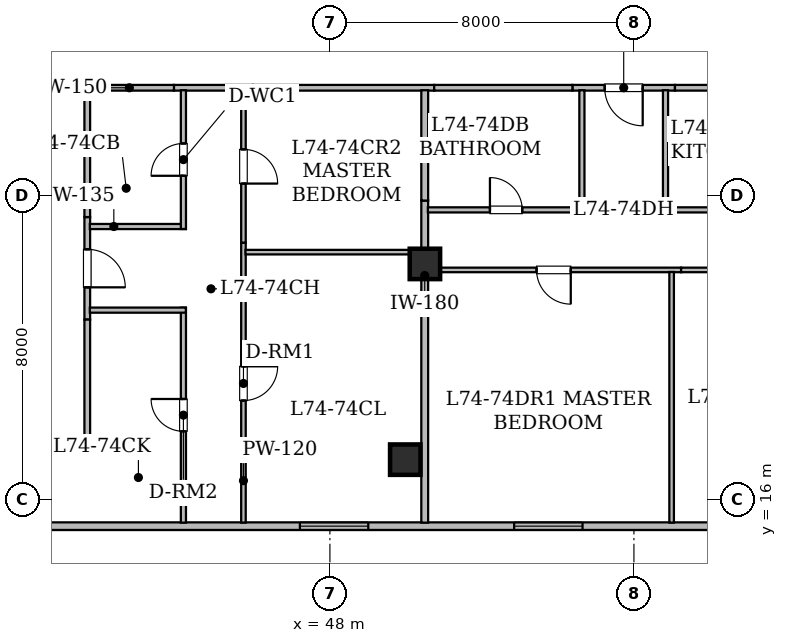
"""IFC4 building model, lengths in metres.
Left out: names, types, materials, properties, quantities, classifications, styles, units other than length and angle.
Written with IfcOpenShell. Run it as: python <this file> out.ifc"""

import sys

from ifc_helpers import new_model, si_unit, direction, frame, frame_2d, origin, origin_2d, place, context, subcontext, project, spatial, rectangle, hollow_rectangle, extrude, element, fill, save


model = new_model("IFC4")
c1 = context("Model", 3, precision=1e-05, world=origin(), true_north=direction((0.0, 1.0)))
c2 = subcontext(c1, "Body", "Model", "MODEL_VIEW")
j1 = project(units=[si_unit("LENGTHUNIT", "METRE"), si_unit("PLANEANGLEUNIT", "RADIAN")], contexts=[c1])
p1 = place(None, origin())
s1 = spatial("IfcSite", under=j1, at=p1, CompositionType="ELEMENT")
p2 = place(p1, origin())
s2 = spatial("IfcBuilding", under=s1, at=p2, CompositionType="ELEMENT")
p3 = place(p2, frame((0.0, 0.0, 290.45)))
s3 = spatial("IfcBuildingStorey", under=s2, at=p3, CompositionType="ELEMENT", Elevation=290.45)
p4 = place(p3, frame((49.983, 17.05, 0.0), z_axis=(0.0, 0.0, 1.0), x_axis=(1.0, 0.0, 0.0)))
e1 = element("IfcColumn", 1, at=p4, inside=s3, PredefinedType="COLUMN", context=c2, shape_type="SweptSolid", body=[
    extrude(hollow_rectangle(XDim=0.8, YDim=0.8, WallThickness=0.04, at=origin_2d()), origin(), (0.0, 0.0, 1.0), 4.175),
])
p5 = place(p3, frame((50.5, 22.2, 0.0), z_axis=(0.0, 0.0, 1.0), x_axis=(1.0, 0.0, 0.0)))
e2 = element("IfcColumn", 2, at=p5, inside=s3, PredefinedType="COLUMN", context=c2, shape_type="SweptSolid", body=[
    extrude(hollow_rectangle(XDim=0.8, YDim=0.8, WallThickness=0.04, at=origin_2d()), origin(), (0.0, 0.0, 1.0), 4.2),
])
p6 = place(p3, frame((61.696, 15.3, 0.0), z_axis=(0.0, 0.0, 1.0), x_axis=(-1.0, 0.0, 0.0)))
e3 = element("IfcWall", 3, at=p6, inside=s3, PredefinedType="STANDARD", context=c2, shape_type="SweptSolid", body=[
    extrude(rectangle(XDim=33.393, YDim=0.2, at=frame_2d((16.697, 0.0))), origin(), (0.0, 0.0, 1.0), 3.78),
])
p7 = place(p6, frame((26.486, 0.0, 0.85)))
e4 = element("IfcOpeningElement", 4, at=p7, cuts=e3, PredefinedType="OPENING", context=c2, shape_type="SweptSolid", body=[
    extrude(rectangle(XDim=1.8, YDim=0.92, at=frame_2d((0.9, 0.46))), frame((0.0, 0.11, 0.0), z_axis=(0.0, -1.0, 0.0), x_axis=(1.0, 0.0, 0.0)), (0.0, 0.0, 1.0), 0.22),
])
p8 = place(p6, frame((12.686, 0.0, 0.85)))
e5 = element("IfcOpeningElement", 5, at=p8, cuts=e3, PredefinedType="OPENING", context=c2, shape_type="SweptSolid", body=[
    extrude(rectangle(XDim=1.8, YDim=0.92, at=frame_2d((0.9, 0.46))), frame((0.0, 0.11, 0.0), z_axis=(0.0, -1.0, 0.0), x_axis=(1.0, 0.0, 0.0)), (0.0, 0.0, 1.0), 0.22),
])
p9 = place(p6, frame((7.048, 0.0, 0.85)))
e6 = element("IfcOpeningElement", 6, at=p9, cuts=e3, PredefinedType="OPENING", context=c2, shape_type="SweptSolid", body=[
    extrude(rectangle(XDim=1.8, YDim=0.92, at=frame_2d((0.9, 0.46))), frame((0.0, 0.11, 0.0), z_axis=(0.0, -1.0, 0.0), x_axis=(1.0, 0.0, 0.0)), (0.0, 0.0, 1.0), 0.22),
])
p10 = place(p6, frame((1.844, 0.0, 0.85)))
e7 = element("IfcOpeningElement", 7, at=p10, cuts=e3, PredefinedType="OPENING", context=c2, shape_type="SweptSolid", body=[
    extrude(rectangle(XDim=1.8, YDim=0.92, at=frame_2d((0.9, 0.46))), frame((0.0, 0.11, 0.0), z_axis=(0.0, -1.0, 0.0), x_axis=(1.0, 0.0, 0.0)), (0.0, 0.0, 1.0), 0.22),
])
p11 = place(p3, frame((45.974, 26.835, 0.0), z_axis=(0.0, 0.0, 1.0), x_axis=(-1.0, 0.0, 0.0)))
e8 = element("IfcWall", 8, at=p11, inside=s3, PredefinedType="STANDARD", context=c2, shape_type="SweptSolid", body=[
    extrude(rectangle(XDim=2.078, YDim=0.15, at=frame_2d((1.039, 0.0))), origin(), (0.0, 0.0, 1.0), 3.78),
])
p12 = place(p3, frame((41.615, 23.433, 0.0), z_axis=(0.0, 0.0, 1.0), x_axis=(0.0, -1.0, 0.0)))
e9 = element("IfcWall", 9, at=p12, inside=s3, PredefinedType="STANDARD", context=c2, shape_type="SweptSolid", body=[
    extrude(rectangle(XDim=2.698, YDim=0.15, at=frame_2d((1.349, 0.0))), origin(), (0.0, 0.0, 1.0), 2.22),
])
p13 = place(p12, frame((0.849, 0.0, 0.0)))
e10 = element("IfcOpeningElement", 10, at=p13, cuts=e9, PredefinedType="OPENING", context=c2, shape_type="SweptSolid", body=[
    extrude(rectangle(XDim=1.0, YDim=2.15, at=frame_2d((0.5, 1.075))), frame((0.0, 0.085, 0.0), z_axis=(0.0, -1.0, 0.0), x_axis=(1.0, 0.0, 0.0)), (0.0, 0.0, 1.0), 0.17),
])
p14 = place(p3, frame((43.896, 26.835, 0.0), z_axis=(0.0, 0.0, 1.0), x_axis=(-1.0, 0.0, 0.0)))
e11 = element("IfcWall", 11, at=p14, inside=s3, PredefinedType="STANDARD", context=c2, shape_type="SweptSolid", body=[
    extrude(rectangle(XDim=2.346, YDim=0.15, at=frame_2d((1.173, 0.0))), origin(), (0.0, 0.0, 1.0), 3.78),
])
p15 = place(p3, frame((41.615, 26.898, 0.0), z_axis=(0.0, 0.0, 1.0), x_axis=(0.0, -1.0, 0.0)))
e12 = element("IfcWall", 12, at=p15, inside=s3, PredefinedType="STANDARD", context=c2, shape_type="SweptSolid", body=[
    extrude(rectangle(XDim=3.465, YDim=0.15, at=frame_2d((1.732, 0.0))), origin(), (0.0, 0.0, 1.0), 2.22),
])
p16 = place(p3, frame((41.615, 20.735, 0.0), z_axis=(0.0, 0.0, 1.0), x_axis=(0.0, -1.0, 0.0)))
e13 = element("IfcWall", 13, at=p16, inside=s3, PredefinedType="STANDARD", context=c2, shape_type="SweptSolid", body=[
    extrude(rectangle(XDim=3.135, YDim=0.15, at=frame_2d((1.567, 0.0))), origin(), (0.0, 0.0, 1.0), 2.22),
])
p17 = place(p3, frame((50.744, 26.835, 0.0), z_axis=(0.0, 0.0, 1.0), x_axis=(-1.0, 0.0, 0.0)))
e14 = element("IfcWall", 14, at=p17, inside=s3, PredefinedType="STANDARD", context=c2, shape_type="SweptSolid", body=[
    extrude(rectangle(XDim=4.77, YDim=0.15, at=frame_2d((2.385, 0.0))), origin(), (0.0, 0.0, 1.0), 2.22),
])
p18 = place(p3, frame((57.08, 26.835, 0.0), z_axis=(0.0, 0.0, 1.0), x_axis=(-1.0, 0.0, 0.0)))
e15 = element("IfcWall", 15, at=p18, inside=s3, PredefinedType="STANDARD", context=c2, shape_type="SweptSolid", body=[
    extrude(rectangle(XDim=2.698, YDim=0.15, at=frame_2d((1.349, 0.0))), origin(), (0.0, 0.0, 1.0), 3.78),
])
p19 = place(p18, frame((0.849, 0.0, 0.0)))
e16 = element("IfcOpeningElement", 16, at=p19, cuts=e15, PredefinedType="OPENING", context=c2, shape_type="SweptSolid", body=[
    extrude(rectangle(XDim=1.0, YDim=2.15, at=frame_2d((0.5, 1.075))), frame((0.0, 0.085, 0.0), z_axis=(0.0, -1.0, 0.0), x_axis=(1.0, 0.0, 0.0)), (0.0, 0.0, 1.0), 0.17),
])
p20 = place(p3, frame((54.382, 26.835, 0.0), z_axis=(0.0, 0.0, 1.0), x_axis=(-1.0, 0.0, 0.0)))
e17 = element("IfcWall", 17, at=p20, inside=s3, PredefinedType="STANDARD", context=c2, shape_type="SweptSolid", body=[
    extrude(rectangle(XDim=3.638, YDim=0.15, at=frame_2d((1.819, 0.0))), origin(), (0.0, 0.0, 1.0), 2.22),
])
p21 = place(p3, frame((60.69, 26.835, 0.0), z_axis=(0.0, 0.0, 1.0), x_axis=(-1.0, 0.0, 0.0)))
e18 = element("IfcWall", 18, at=p21, inside=s3, PredefinedType="STANDARD", context=c2, shape_type="SweptSolid", body=[
    extrude(rectangle(XDim=3.61, YDim=0.15, at=frame_2d((1.805, 0.0))), origin(), (0.0, 0.0, 1.0), 3.78),
])
p22 = place(p3, frame((41.682, 23.184, 0.0), z_axis=(0.0, 0.0, 1.0), x_axis=(1.0, 0.0, 0.0)))
e19 = element("IfcWall", 19, at=p22, inside=s3, PredefinedType="PARTITIONING", context=c2, shape_type="SweptSolid", body=[
    extrude(rectangle(XDim=2.528, YDim=0.135, at=frame_2d((1.264, 0.0))), origin(), (0.0, 0.0, 1.0), 2.22),
])
p23 = place(p3, frame((44.145, 23.119, 0.0), z_axis=(0.0, 0.0, 1.0), x_axis=(0.0, 1.0, 0.0)))
e20 = element("IfcWall", 20, at=p23, inside=s3, PredefinedType="PARTITIONING", context=c2, shape_type="SweptSolid", body=[
    extrude(rectangle(XDim=3.651, YDim=0.135, at=frame_2d((1.826, 0.0))), origin(), (0.0, 0.0, 1.0), 2.22),
])
p24 = place(p23, frame((1.4, 0.0, 0.0)))
e21 = element("IfcOpeningElement", 21, at=p24, cuts=e20, PredefinedType="OPENING", context=c2, shape_type="SweptSolid", body=[
    extrude(rectangle(XDim=0.85, YDim=2.1, at=frame_2d((0.425, 1.05))), frame((0.0, 0.077, 0.0), z_axis=(0.0, -1.0, 0.0), x_axis=(1.0, 0.0, 0.0)), (0.0, 0.0, 1.0), 0.155),
])
p25 = place(p3, frame((44.145, 15.392, 0.0), z_axis=(0.0, 0.0, 1.0), x_axis=(0.0, 1.0, 0.0)))
e22 = element("IfcWall", 22, at=p25, inside=s3, PredefinedType="PARTITIONING", context=c2, shape_type="SweptSolid", body=[
    extrude(rectangle(XDim=5.657, YDim=0.135, at=frame_2d((2.829, 0.0))), origin(), (0.0, 0.0, 1.0), 2.22),
])
p26 = place(p25, frame((2.404, 0.0, 0.0)))
e23 = element("IfcOpeningElement", 23, at=p26, cuts=e22, PredefinedType="OPENING", context=c2, shape_type="SweptSolid", body=[
    extrude(rectangle(XDim=0.85, YDim=2.1, at=frame_2d((0.425, 1.05))), frame((0.0, 0.077, 0.0), z_axis=(0.0, -1.0, 0.0), x_axis=(1.0, 0.0, 0.0)), (0.0, 0.0, 1.0), 0.155),
])
p27 = place(p3, frame((44.21, 20.984, 0.0), z_axis=(0.0, 0.0, 1.0), x_axis=(-1.0, 0.0, 0.0)))
e24 = element("IfcWall", 24, at=p27, inside=s3, PredefinedType="PARTITIONING", context=c2, shape_type="SweptSolid", body=[
    extrude(rectangle(XDim=2.528, YDim=0.135, at=frame_2d((1.264, 0.0))), origin(), (0.0, 0.0, 1.0), 2.22),
])
p28 = place(p3, frame((45.725, 22.759, 0.0), z_axis=(0.0, 0.0, 1.0), x_axis=(0.0, -1.0, 0.0)))
e25 = element("IfcWall", 25, at=p28, inside=s3, PredefinedType="PARTITIONING", context=c2, shape_type="SweptSolid", body=[
    extrude(rectangle(XDim=7.367, YDim=0.12, at=frame_2d((3.684, 0.0))), origin(), (0.0, 0.0, 1.0), 2.22),
])
p29 = place(p28, frame((3.254, 0.0, 0.0)))
e26 = element("IfcOpeningElement", 26, at=p29, cuts=e25, PredefinedType="OPENING", context=c2, shape_type="SweptSolid", body=[
    extrude(rectangle(XDim=0.9, YDim=2.1, at=frame_2d((0.45, 1.05))), frame((0.0, 0.07, 0.0), z_axis=(0.0, -1.0, 0.0), x_axis=(1.0, 0.0, 0.0)), (0.0, 0.0, 1.0), 0.14),
])
p30 = place(p3, frame((45.725, 26.77, 0.0), z_axis=(0.0, 0.0, 1.0), x_axis=(0.0, -1.0, 0.0)))
e27 = element("IfcWall", 27, at=p30, inside=s3, PredefinedType="PARTITIONING", context=c2, shape_type="SweptSolid", body=[
    extrude(rectangle(XDim=4.011, YDim=0.12, at=frame_2d((2.005, 0.0))), origin(), (0.0, 0.0, 1.0), 2.22),
])
p31 = place(p30, frame((1.556, 0.0, 0.0)))
e28 = element("IfcOpeningElement", 28, at=p31, cuts=e27, PredefinedType="OPENING", context=c2, shape_type="SweptSolid", body=[
    extrude(rectangle(XDim=0.9, YDim=2.1, at=frame_2d((0.45, 1.05))), frame((0.0, 0.07, 0.0), z_axis=(0.0, -1.0, 0.0), x_axis=(1.0, 0.0, 0.0)), (0.0, 0.0, 1.0), 0.14),
])
p32 = place(p3, frame((45.779, 22.51, 0.0), z_axis=(0.0, 0.0, 1.0), x_axis=(1.0, 0.0, 0.0)))
e29 = element("IfcWall", 29, at=p32, inside=s3, PredefinedType="PARTITIONING", context=c2, shape_type="SweptSolid", body=[
    extrude(rectangle(XDim=4.651, YDim=0.12, at=frame_2d((2.325, 0.0))), origin(), (0.0, 0.0, 1.0), 2.22),
])
p33 = place(p3, frame((50.495, 22.445, 0.0), z_axis=(0.0, 0.0, 1.0), x_axis=(0.0, -1.0, 0.0)))
e30 = element("IfcWall", 30, at=p33, inside=s3, PredefinedType="STANDARD", context=c2, shape_type="SweptSolid", body=[
    extrude(rectangle(XDim=0.647, YDim=0.18, at=frame_2d((0.323, 0.0))), origin(), (0.0, 0.0, 1.0), 2.22),
])
p34 = place(p3, frame((50.495, 21.798, 0.0), z_axis=(0.0, 0.0, 1.0), x_axis=(0.0, -1.0, 0.0)))
e31 = element("IfcWall", 31, at=p34, inside=s3, PredefinedType="STANDARD", context=c2, shape_type="SweptSolid", body=[
    extrude(rectangle(XDim=6.406, YDim=0.18, at=frame_2d((3.203, 0.0))), origin(), (0.0, 0.0, 1.0), 2.22),
])
p35 = place(p3, frame((50.495, 23.867, 0.0), z_axis=(0.0, 0.0, 1.0), x_axis=(0.0, -1.0, 0.0)))
e32 = element("IfcWall", 32, at=p35, inside=s3, PredefinedType="STANDARD", context=c2, shape_type="SweptSolid", body=[
    extrude(rectangle(XDim=1.292, YDim=0.18, at=frame_2d((0.646, 0.0))), origin(), (0.0, 0.0, 1.0), 2.22),
])
p36 = place(p3, frame((50.495, 26.77, 0.0), z_axis=(0.0, 0.0, 1.0), x_axis=(0.0, -1.0, 0.0)))
e33 = element("IfcWall", 33, at=p36, inside=s3, PredefinedType="STANDARD", context=c2, shape_type="SweptSolid", body=[
    extrude(rectangle(XDim=2.903, YDim=0.18, at=frame_2d((1.452, 0.0))), origin(), (0.0, 0.0, 1.0), 2.22),
])
p37 = place(p3, frame((50.577, 23.622, 0.0), z_axis=(0.0, 0.0, 1.0), x_axis=(1.0, 0.0, 0.0)))
e34 = element("IfcWall", 34, at=p37, inside=s3, PredefinedType="PARTITIONING", context=c2, shape_type="SweptSolid", body=[
    extrude(rectangle(XDim=4.119, YDim=0.135, at=frame_2d((2.06, 0.0))), origin(), (0.0, 0.0, 1.0), 2.22),
])
p38 = place(p37, frame((1.634, 0.0, 0.0)))
e35 = element("IfcOpeningElement", 35, at=p38, cuts=e34, PredefinedType="OPENING", context=c2, shape_type="SweptSolid", body=[
    extrude(rectangle(XDim=0.85, YDim=2.1, at=frame_2d((0.425, 1.05))), frame((0.0, 0.077, 0.0), z_axis=(0.0, -1.0, 0.0), x_axis=(1.0, 0.0, 0.0)), (0.0, 0.0, 1.0), 0.155),
])
for number, where, z_axis, x_axis in (
    (36, (54.631, 23.557, 0.0), (0.0, 0.0, 1.0), (0.0, 1.0, 0.0)),
    (37, (56.831, 26.77, 0.0), (0.0, 0.0, 1.0), (0.0, -1.0, 0.0)),
):
    element("IfcWall", number, at=place(p3, frame(where, z_axis=z_axis, x_axis=x_axis)), inside=s3, PredefinedType="PARTITIONING", context=c2, shape_type="SweptSolid", body=[
        extrude(rectangle(XDim=3.213, YDim=0.135, at=frame_2d((1.606, 0.0))), origin(), (0.0, 0.0, 1.0), 3.78),
    ])
p39 = place(p3, frame((56.766, 23.622, 0.0), z_axis=(0.0, 0.0, 1.0), x_axis=(1.0, 0.0, 0.0)))
e38 = element("IfcWall", 38, at=p39, inside=s3, PredefinedType="PARTITIONING", context=c2, shape_type="SweptSolid", body=[
    extrude(rectangle(XDim=4.995, YDim=0.135, at=frame_2d((2.498, 0.0))), origin(), (0.0, 0.0, 1.0), 2.22),
])
p40 = place(p39, frame((2.073, 0.0, 0.0)))
e39 = element("IfcOpeningElement", 39, at=p40, cuts=e38, PredefinedType="OPENING", context=c2, shape_type="SweptSolid", body=[
    extrude(rectangle(XDim=0.85, YDim=2.1, at=frame_2d((0.425, 1.05))), frame((0.0, 0.077, 0.0), z_axis=(0.0, -1.0, 0.0), x_axis=(1.0, 0.0, 0.0)), (0.0, 0.0, 1.0), 0.155),
])
p41 = place(p3, frame((57.241, 22.042, 0.0), z_axis=(0.0, 0.0, 1.0), x_axis=(-1.0, 0.0, 0.0)))
e40 = element("IfcWall", 40, at=p41, inside=s3, PredefinedType="PARTITIONING", context=c2, shape_type="SweptSolid", body=[
    extrude(rectangle(XDim=6.664, YDim=0.12, at=frame_2d((3.332, 0.0))), origin(), (0.0, 0.0, 1.0), 2.22),
])
p42 = place(p41, frame((2.903, 0.0, 0.0)))
e41 = element("IfcOpeningElement", 41, at=p42, cuts=e40, PredefinedType="OPENING", context=c2, shape_type="SweptSolid", body=[
    extrude(rectangle(XDim=0.9, YDim=2.1, at=frame_2d((0.45, 1.05))), frame((0.0, 0.07, 0.0), z_axis=(0.0, -1.0, 0.0), x_axis=(1.0, 0.0, 0.0)), (0.0, 0.0, 1.0), 0.14),
])
p43 = place(p3, frame((64.808, 22.042, 0.0), z_axis=(0.0, 0.0, 1.0), x_axis=(-1.0, 0.0, 0.0)))
e42 = element("IfcWall", 42, at=p43, inside=s3, PredefinedType="PARTITIONING", context=c2, shape_type="SweptSolid", body=[
    extrude(rectangle(XDim=7.567, YDim=0.12, at=frame_2d((3.784, 0.0))), origin(), (0.0, 0.0, 1.0), 2.22),
])
p44 = place(p43, frame((3.333, 0.0, 0.0)))
e43 = element("IfcOpeningElement", 43, at=p44, cuts=e42, PredefinedType="OPENING", context=c2, shape_type="SweptSolid", body=[
    extrude(rectangle(XDim=0.9, YDim=2.1, at=frame_2d((0.45, 1.05))), frame((0.0, 0.07, 0.0), z_axis=(0.0, -1.0, 0.0), x_axis=(1.0, 0.0, 0.0)), (0.0, 0.0, 1.0), 0.14),
])
p45 = place(p3, frame((56.992, 21.988, 0.0), z_axis=(0.0, 0.0, 1.0), x_axis=(0.0, -1.0, 0.0)))
e44 = element("IfcWall", 44, at=p45, inside=s3, PredefinedType="PARTITIONING", context=c2, shape_type="SweptSolid", body=[
    extrude(rectangle(XDim=6.596, YDim=0.12, at=frame_2d((3.298, 0.0))), origin(), (0.0, 0.0, 1.0), 2.22),
])
p46 = place(p8, origin())
e45 = element("IfcWindow", 45, at=p46, inside=s3, PartitioningType="SINGLE_PANEL", PredefinedType="WINDOW", context=c2, shape_type="SweptSolid", body=[
    extrude(rectangle(XDim=1.8, YDim=0.92, at=frame_2d((0.9, 0.46))), frame((0.0, 0.03, 0.0), z_axis=(0.0, -1.0, 0.0), x_axis=(1.0, 0.0, 0.0)), (0.0, 0.0, 1.0), 0.06),
])
fill(e5, e45)
p47 = place(p9, origin())
e46 = element("IfcWindow", 46, at=p47, inside=s3, PartitioningType="SINGLE_PANEL", PredefinedType="WINDOW", context=c2, shape_type="SweptSolid", body=[
    extrude(rectangle(XDim=1.8, YDim=0.92, at=frame_2d((0.9, 0.46))), frame((0.0, 0.03, 0.0), z_axis=(0.0, -1.0, 0.0), x_axis=(1.0, 0.0, 0.0)), (0.0, 0.0, 1.0), 0.06),
])
fill(e6, e46)
p48 = place(p13, origin())
e47 = element("IfcDoor", 47, at=p48, inside=s3, OperationType="SINGLE_SWING_RIGHT", PredefinedType="DOOR", context=c2, shape_type="SweptSolid", body=[
    extrude(rectangle(XDim=1.0, YDim=2.15, at=frame_2d((0.5, 1.075))), frame((0.0, 0.025, 0.0), z_axis=(0.0, -1.0, 0.0), x_axis=(1.0, 0.0, 0.0)), (0.0, 0.0, 1.0), 0.05),
])
fill(e10, e47)
p49 = place(p19, origin())
e48 = element("IfcDoor", 48, at=p49, inside=s3, OperationType="SINGLE_SWING_LEFT", PredefinedType="DOOR", context=c2, shape_type="SweptSolid", body=[
    extrude(rectangle(XDim=1.0, YDim=2.15, at=frame_2d((0.5, 1.075))), frame((0.0, 0.025, 0.0), z_axis=(0.0, -1.0, 0.0), x_axis=(1.0, 0.0, 0.0)), (0.0, 0.0, 1.0), 0.05),
])
fill(e16, e48)
p50 = place(p24, origin())
e49 = element("IfcDoor", 49, at=p50, inside=s3, OperationType="SINGLE_SWING_LEFT", PredefinedType="DOOR", context=c2, shape_type="SweptSolid", body=[
    extrude(rectangle(XDim=0.85, YDim=2.1, at=frame_2d((0.425, 1.05))), frame((0.0, 0.025, 0.0), z_axis=(0.0, -1.0, 0.0), x_axis=(1.0, 0.0, 0.0)), (0.0, 0.0, 1.0), 0.05),
])
fill(e21, e49)
p51 = place(p26, origin())
e50 = element("IfcDoor", 50, at=p51, inside=s3, OperationType="SINGLE_SWING_RIGHT", PredefinedType="DOOR", context=c2, shape_type="SweptSolid", body=[
    extrude(rectangle(XDim=0.85, YDim=2.1, at=frame_2d((0.425, 1.05))), frame((0.0, 0.025, 0.0), z_axis=(0.0, -1.0, 0.0), x_axis=(1.0, 0.0, 0.0)), (0.0, 0.0, 1.0), 0.05),
])
fill(e23, e50)
p52 = place(p29, origin())
e51 = element("IfcDoor", 51, at=p52, inside=s3, OperationType="SINGLE_SWING_LEFT", PredefinedType="DOOR", context=c2, shape_type="SweptSolid", body=[
    extrude(rectangle(XDim=0.9, YDim=2.1, at=frame_2d((0.45, 1.05))), frame((0.0, 0.025, 0.0), z_axis=(0.0, -1.0, 0.0), x_axis=(1.0, 0.0, 0.0)), (0.0, 0.0, 1.0), 0.05),
])
fill(e26, e51)
p53 = place(p31, origin())
e52 = element("IfcDoor", 52, at=p53, inside=s3, OperationType="SINGLE_SWING_RIGHT", PredefinedType="DOOR", context=c2, shape_type="SweptSolid", body=[
    extrude(rectangle(XDim=0.9, YDim=2.1, at=frame_2d((0.45, 1.05))), frame((0.0, 0.025, 0.0), z_axis=(0.0, -1.0, 0.0), x_axis=(1.0, 0.0, 0.0)), (0.0, 0.0, 1.0), 0.05),
])
fill(e28, e52)
p54 = place(p38, origin())
e53 = element("IfcDoor", 53, at=p54, inside=s3, OperationType="SINGLE_SWING_LEFT", PredefinedType="DOOR", context=c2, shape_type="SweptSolid", body=[
    extrude(rectangle(XDim=0.85, YDim=2.1, at=frame_2d((0.425, 1.05))), frame((0.0, 0.025, 0.0), z_axis=(0.0, -1.0, 0.0), x_axis=(1.0, 0.0, 0.0)), (0.0, 0.0, 1.0), 0.05),
])
fill(e35, e53)
p55 = place(p42, origin())
e54 = element("IfcDoor", 54, at=p55, inside=s3, OperationType="SINGLE_SWING_LEFT", PredefinedType="DOOR", context=c2, shape_type="SweptSolid", body=[
    extrude(rectangle(XDim=0.9, YDim=2.1, at=frame_2d((0.45, 1.05))), frame((0.0, 0.025, 0.0), z_axis=(0.0, -1.0, 0.0), x_axis=(1.0, 0.0, 0.0)), (0.0, 0.0, 1.0), 0.05),
])
fill(e41, e54)
save(model, sys.argv[1])
